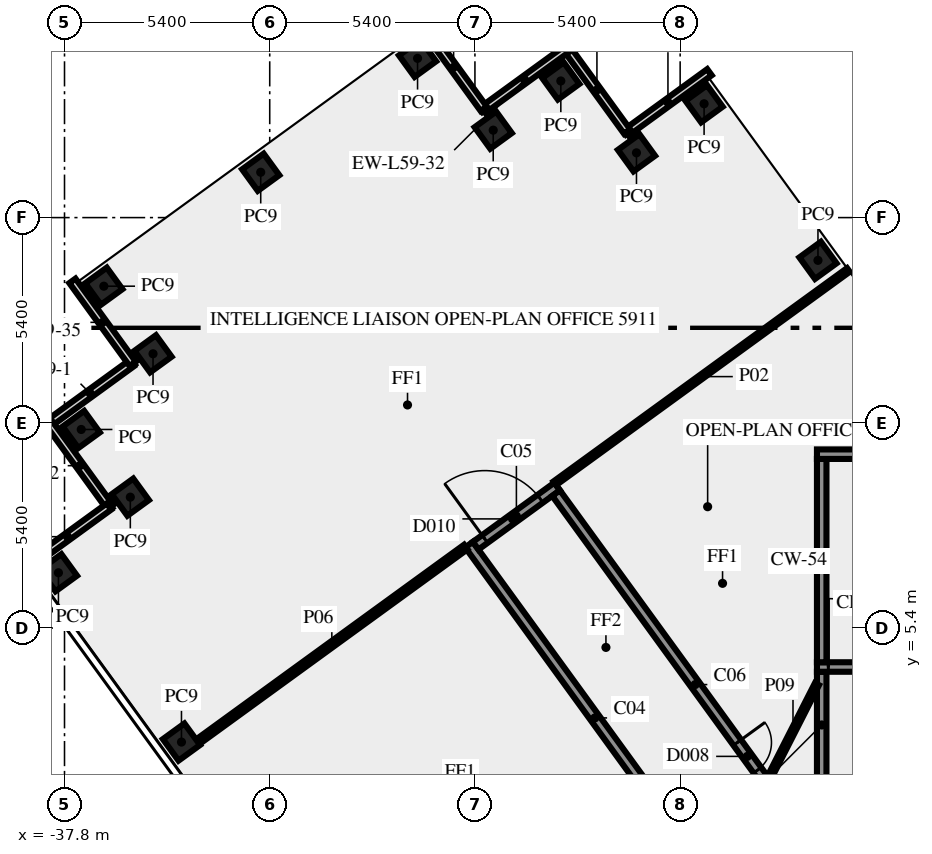
"""IFC4 building model, lengths in metres.
Left out: names, types, materials, properties, quantities, classifications, styles, units other than length and angle.
Written with IfcOpenShell. Run it as: python <this file> out.ifc"""

import sys

from ifc_helpers import new_model, si_unit, direction, frame, frame_2d, origin, origin_2d, place, context, subcontext, project, spatial, rectangle, extrude, element, fill, save


model = new_model("IFC4")
c1 = context("Model", 3, precision=1e-05, world=origin(), true_north=direction((0.0, 1.0)))
c2 = subcontext(c1, "Body", "Model", "MODEL_VIEW")
j1 = project(units=[si_unit("LENGTHUNIT", "METRE"), si_unit("PLANEANGLEUNIT", "RADIAN")], contexts=[c1])
p1 = place(None, origin())
s1 = spatial("IfcSite", under=j1, at=p1, CompositionType="ELEMENT")
p2 = place(p1, origin())
s2 = spatial("IfcBuilding", under=s1, at=p2, CompositionType="ELEMENT")
p3 = place(p2, frame((0.0, 0.0, 253.0)))
s3 = spatial("IfcBuildingStorey", under=s2, at=p3, CompositionType="ELEMENT", Elevation=253.0)
for number, where, z_axis, x_axis in (
    (1, (-17.974, 15.075, 0.0), (0.0, 0.0, 1.0), (-0.588, 0.809, 0.0)),
    (2, (-20.97, 19.195, 0.0), (0.0, 0.0, 1.0), (-0.588, 0.809, 0.0)),
    (3, (-22.749, 17.904, 0.0), (0.0, 0.0, 1.0), (-0.588, 0.809, 0.0)),
    (4, (-24.74, 19.795, 0.0), (0.0, 0.0, 1.0), (-0.588, 0.809, 0.0)),
    (5, (-26.519, 18.5, 0.0), (0.0, 0.0, 1.0), (-0.588, 0.809, 0.0)),
    (6, (-28.51, 20.39, 0.0), (0.0, 0.0, 1.0), (-0.809, -0.588, 0.0)),
    (7, (-32.637, 17.393, 0.0), (0.0, 0.0, 1.0), (-0.809, -0.588, 0.0)),
    (8, (-36.765, 14.395, 0.0), (0.0, 0.0, 1.0), (0.588, -0.809, 0.0)),
    (9, (-35.471, 12.616, 0.0), (0.0, 0.0, 1.0), (-0.809, -0.588, 0.0)),
    (10, (-37.36, 10.625, 0.0), (0.0, 0.0, 1.0), (0.588, -0.809, 0.0)),
    (11, (-36.068, 8.844, 0.0), (0.0, 0.0, 1.0), (0.588, -0.809, 0.0)),
    (12, (-37.96, 6.855, 0.0), (0.0, 0.0, 1.0), (0.588, -0.809, 0.0)),
    (13, (-34.722, 2.4, 0.0), (0.0, 0.0, 1.0), (0.588, -0.809, 0.0)),
):
    element("IfcColumn", number, at=place(p3, frame(where, z_axis=z_axis, x_axis=x_axis)), inside=s3, PredefinedType="COLUMN", context=c2, shape_type="SweptSolid", body=[
        extrude(rectangle(XDim=0.7, YDim=0.7, at=origin_2d()), origin(), (0.0, 0.0, 1.0), 3.65),
    ])
for number, where, z_axis, x_axis in (
    (14, (-36.032, 12.369, 0.0), (0.0, 0.0, 1.0), (-0.809, -0.588, 0.0)),
    (15, (-38.189, 10.765, 0.0), (0.0, 0.0, 1.0), (0.588, -0.809, 0.0)),
    (16, (-36.629, 8.597, 0.0), (0.0, 0.0, 1.0), (-0.809, -0.588, 0.0)),
    (17, (-20.829, 20.025, 0.0), (0.0, 0.0, 1.0), (-0.809, -0.588, 0.0)),
    (18, (-22.996, 18.466, 0.0), (0.0, 0.0, 1.0), (-0.588, 0.809, 0.0)),
):
    element("IfcWall", number, at=place(p3, frame(where, z_axis=z_axis, x_axis=x_axis)), inside=s3, PredefinedType="SOLIDWALL", context=c2, shape_type="SweptSolid", body=[
        extrude(rectangle(XDim=2.7, YDim=0.2, at=frame_2d((1.35, 0.0))), origin(), (0.0, 0.0, 1.0), 3.65),
    ])
for number, where, z_axis, x_axis in (
    (19, (-24.6, 20.623, 0.0), (0.0, 0.0, 1.0), (-0.809, -0.588, 0.0)),
    (20, (-26.768, 19.063, 0.0), (0.0, 0.0, 1.0), (-0.588, 0.809, 0.0)),
):
    element("IfcWall", number, at=place(p3, frame(where, z_axis=z_axis, x_axis=x_axis)), inside=s3, PredefinedType="SOLIDWALL", context=c2, shape_type="SweptSolid", body=[
        extrude(rectangle(XDim=2.7, YDim=0.2, at=frame_2d((1.35, 0.0))), origin(), (0.0, 0.0, 1.0), 3.65),
    ])
p4 = place(p3, frame((-37.592, 14.536, 0.0), z_axis=(0.0, 0.0, 1.0), x_axis=(0.587762999008, -0.809033161865, 0.0)))
e21 = element("IfcWall", 21, at=p4, inside=s3, PredefinedType="SOLIDWALL", context=c2, shape_type="SweptSolid", body=[
    extrude(rectangle(XDim=2.7, YDim=0.2, at=frame_2d((1.35, 0.0))), origin(), (0.0, 0.0, 1.0), 3.65),
])
p5 = place(p3, frame((-17.875, 1.45, 0.0), z_axis=(0.0, 0.0, 1.0), x_axis=(0.0, 1.0, 0.0)))
e22 = element("IfcWall", 22, at=p5, inside=s3, PredefinedType="SHEAR", context=c2, shape_type="SweptSolid", body=[
    extrude(rectangle(XDim=2.8, YDim=0.25, at=frame_2d((1.4, 0.0))), origin(), (0.0, 0.0, 1.0), 3.65),
])
p6 = place(p3, frame((-18.0, 4.375, 0.0), z_axis=(0.0, 0.0, 1.0), x_axis=(1.0, 0.0, 0.0)))
e23 = element("IfcWall", 23, at=p6, inside=s3, PredefinedType="SHEAR", context=c2, shape_type="SweptSolid", body=[
    extrude(rectangle(XDim=10.5, YDim=0.25, at=frame_2d((5.25, 0.0))), origin(), (0.0, 0.0, 1.0), 3.65),
])
p7 = place(p6, frame((0.3, 0.0, 0.0)))
e24 = element("IfcOpeningElement", 24, at=p7, cuts=e23, PredefinedType="OPENING", context=c2, shape_type="SweptSolid", body=[
    extrude(rectangle(XDim=1.8, YDim=2.1, at=frame_2d((0.9, 1.05))), frame((0.0, 0.135, 0.0), z_axis=(0.0, -1.0, 0.0), x_axis=(1.0, 0.0, 0.0)), (0.0, 0.0, 1.0), 0.27),
])
p8 = place(p3, frame((-17.875, 4.5, 0.0), z_axis=(0.0, 0.0, 1.0), x_axis=(0.0, 1.0, 0.0)))
e25 = element("IfcWall", 25, at=p8, inside=s3, PredefinedType="SHEAR", context=c2, shape_type="SweptSolid", body=[
    extrude(rectangle(XDim=5.35, YDim=0.25, at=frame_2d((2.675, 0.0))), origin(), (0.0, 0.0, 1.0), 3.65),
])
p9 = place(p3, frame((-18.0, 9.975, 0.0), z_axis=(0.0, 0.0, 1.0), x_axis=(1.0, 0.0, 0.0)))
e26 = element("IfcWall", 26, at=p9, inside=s3, PredefinedType="SHEAR", context=c2, shape_type="SweptSolid", body=[
    extrude(rectangle(XDim=10.5, YDim=0.25, at=frame_2d((5.25, 0.0))), origin(), (0.0, 0.0, 1.0), 3.65),
])
p10 = place(p9, frame((4.5, 0.0, 1.0)))
e27 = element("IfcOpeningElement", 27, at=p10, cuts=e26, PredefinedType="OPENING", context=c2, shape_type="SweptSolid", body=[
    extrude(rectangle(XDim=1.2, YDim=1.2, at=frame_2d((0.6, 0.6))), frame((0.0, 0.135, 0.0), z_axis=(0.0, -1.0, 0.0), x_axis=(1.0, 0.0, 0.0)), (0.0, 0.0, 1.0), 0.27),
])
p11 = place(p3, frame((-20.531, -1.523, 0.0), z_axis=(0.0, 0.0, 1.0), x_axis=(-0.587782646447, 0.809018887626, 0.0)))
e28 = element("IfcWall", 28, at=p11, inside=s3, PredefinedType="SOLIDWALL", context=c2, shape_type="SweptSolid", body=[
    extrude(rectangle(XDim=11.27, YDim=0.25, at=frame_2d((5.635, 0.0))), origin(), (0.0, 0.0, 1.0), 3.65),
])
p12 = place(p11, frame((0.533, 0.0, 0.0)))
e29 = element("IfcOpeningElement", 29, at=p12, cuts=e28, PredefinedType="OPENING", context=c2, shape_type="SweptSolid", body=[
    extrude(rectangle(XDim=0.9, YDim=2.1, at=frame_2d((0.45, 1.05))), frame((0.0, 0.135, 0.0), z_axis=(0.0, -1.0, 0.0), x_axis=(1.0, 0.0, 0.0)), (0.0, 0.0, 1.0), 0.27),
])
p13 = place(p3, frame((-26.981, 7.567, 0.0), z_axis=(0.0, 0.0, 1.0), x_axis=(0.809038743598, 0.587755315891, 0.0)))
e30 = element("IfcWall", 30, at=p13, inside=s3, PredefinedType="SOLIDWALL", context=c2, shape_type="SweptSolid", body=[
    extrude(rectangle(XDim=2.65, YDim=0.25, at=frame_2d((1.325, 0.0))), origin(), (0.0, 0.0, 1.0), 3.65),
])
p14 = place(p13, frame((0.3, 0.0, 0.0)))
e31 = element("IfcOpeningElement", 31, at=p14, cuts=e30, PredefinedType="OPENING", context=c2, shape_type="SweptSolid", body=[
    extrude(rectangle(XDim=1.8, YDim=2.1, at=frame_2d((0.9, 1.05))), frame((0.0, 0.135, 0.0), z_axis=(0.0, -1.0, 0.0), x_axis=(1.0, 0.0, 0.0)), (0.0, 0.0, 1.0), 0.27),
])
p15 = place(p3, frame((-24.865, 8.95, 0.0), z_axis=(0.0, 0.0, 1.0), x_axis=(0.587791617212, -0.809012369952, 0.0)))
e32 = element("IfcWall", 32, at=p15, inside=s3, PredefinedType="SOLIDWALL", context=c2, shape_type="SweptSolid", body=[
    extrude(rectangle(XDim=12.453, YDim=0.25, at=frame_2d((6.227, 0.0))), origin(), (0.0, 0.0, 1.0), 3.65),
])
p16 = place(p15, frame((8.112, 0.0, 0.0)))
e33 = element("IfcOpeningElement", 33, at=p16, cuts=e32, PredefinedType="OPENING", context=c2, shape_type="SweptSolid", body=[
    extrude(rectangle(XDim=0.9, YDim=2.1, at=frame_2d((0.45, 1.05))), frame((0.0, 0.135, 0.0), z_axis=(0.0, -1.0, 0.0), x_axis=(1.0, 0.0, 0.0)), (0.0, 0.0, 1.0), 0.27),
])
p17 = place(p3, frame((-17.172, 14.823, 0.0), z_axis=(0.0, 0.0, 1.0), x_axis=(-0.809013490065, -0.587790075531, 0.0)))
e34 = element("IfcWall", 34, at=p17, inside=s3, PredefinedType="PARTITIONING", context=c2, shape_type="SweptSolid", body=[
    extrude(rectangle(XDim=9.549, YDim=0.12, at=frame_2d((4.775, 0.0))), origin(), (0.0, 0.0, 1.0), 2.95),
])
p18 = place(p3, frame((-34.291, 2.41, 0.0), z_axis=(0.0, 0.0, 1.0), x_axis=(0.809027940177, 0.587770186393, 0.0)))
e35 = element("IfcWall", 35, at=p18, inside=s3, PredefinedType="PARTITIONING", context=c2, shape_type="SweptSolid", body=[
    extrude(rectangle(XDim=8.715, YDim=0.15, at=frame_2d((4.357, 0.0))), origin(), (0.0, 0.0, 1.0), 3.65),
])
p19 = place(p3, frame((-19.261, 1.45, 0.0), z_axis=(0.0, 0.0, 1.0), x_axis=(0.453950796792, 0.891026752736, 0.0)))
e36 = element("IfcWall", 36, at=p19, inside=s3, PredefinedType="PARTITIONING", context=c2, shape_type="SweptSolid", body=[
    extrude(rectangle(XDim=2.778, YDim=0.12, at=frame_2d((1.389, 0.0))), origin(), (0.0, 0.0, 1.0), 3.65),
])
p20 = place(p7, origin())
e37 = element("IfcDoor", 37, at=p20, inside=s3, OperationType="DOUBLE_DOOR_SINGLE_SWING", PredefinedType="DOOR", context=c2, shape_type="SweptSolid", body=[
    extrude(rectangle(XDim=1.8, YDim=2.1, at=frame_2d((0.9, 1.05))), frame((0.0, 0.025, 0.0), z_axis=(0.0, -1.0, 0.0), x_axis=(1.0, 0.0, 0.0)), (0.0, 0.0, 1.0), 0.05),
])
fill(e24, e37)
p21 = place(p16, origin())
e38 = element("IfcDoor", 38, at=p21, inside=s3, OperationType="SINGLE_SWING_RIGHT", PredefinedType="DOOR", context=c2, shape_type="SweptSolid", body=[
    extrude(rectangle(XDim=0.9, YDim=2.1, at=frame_2d((0.45, 1.05))), frame((0.0, 0.025, 0.0), z_axis=(0.0, -1.0, 0.0), x_axis=(1.0, 0.0, 0.0)), (0.0, 0.0, 1.0), 0.05),
])
fill(e33, e38)
p22 = place(p14, origin())
e39 = element("IfcDoor", 39, at=p22, inside=s3, OperationType="DOUBLE_DOOR_SINGLE_SWING", PredefinedType="DOOR", context=c2, shape_type="SweptSolid", body=[
    extrude(rectangle(XDim=1.8, YDim=2.1, at=frame_2d((0.9, 1.05))), frame((0.0, 0.025, 0.0), z_axis=(0.0, -1.0, 0.0), x_axis=(1.0, 0.0, 0.0)), (0.0, 0.0, 1.0), 0.05),
])
fill(e31, e39)
save(model, sys.argv[1])
